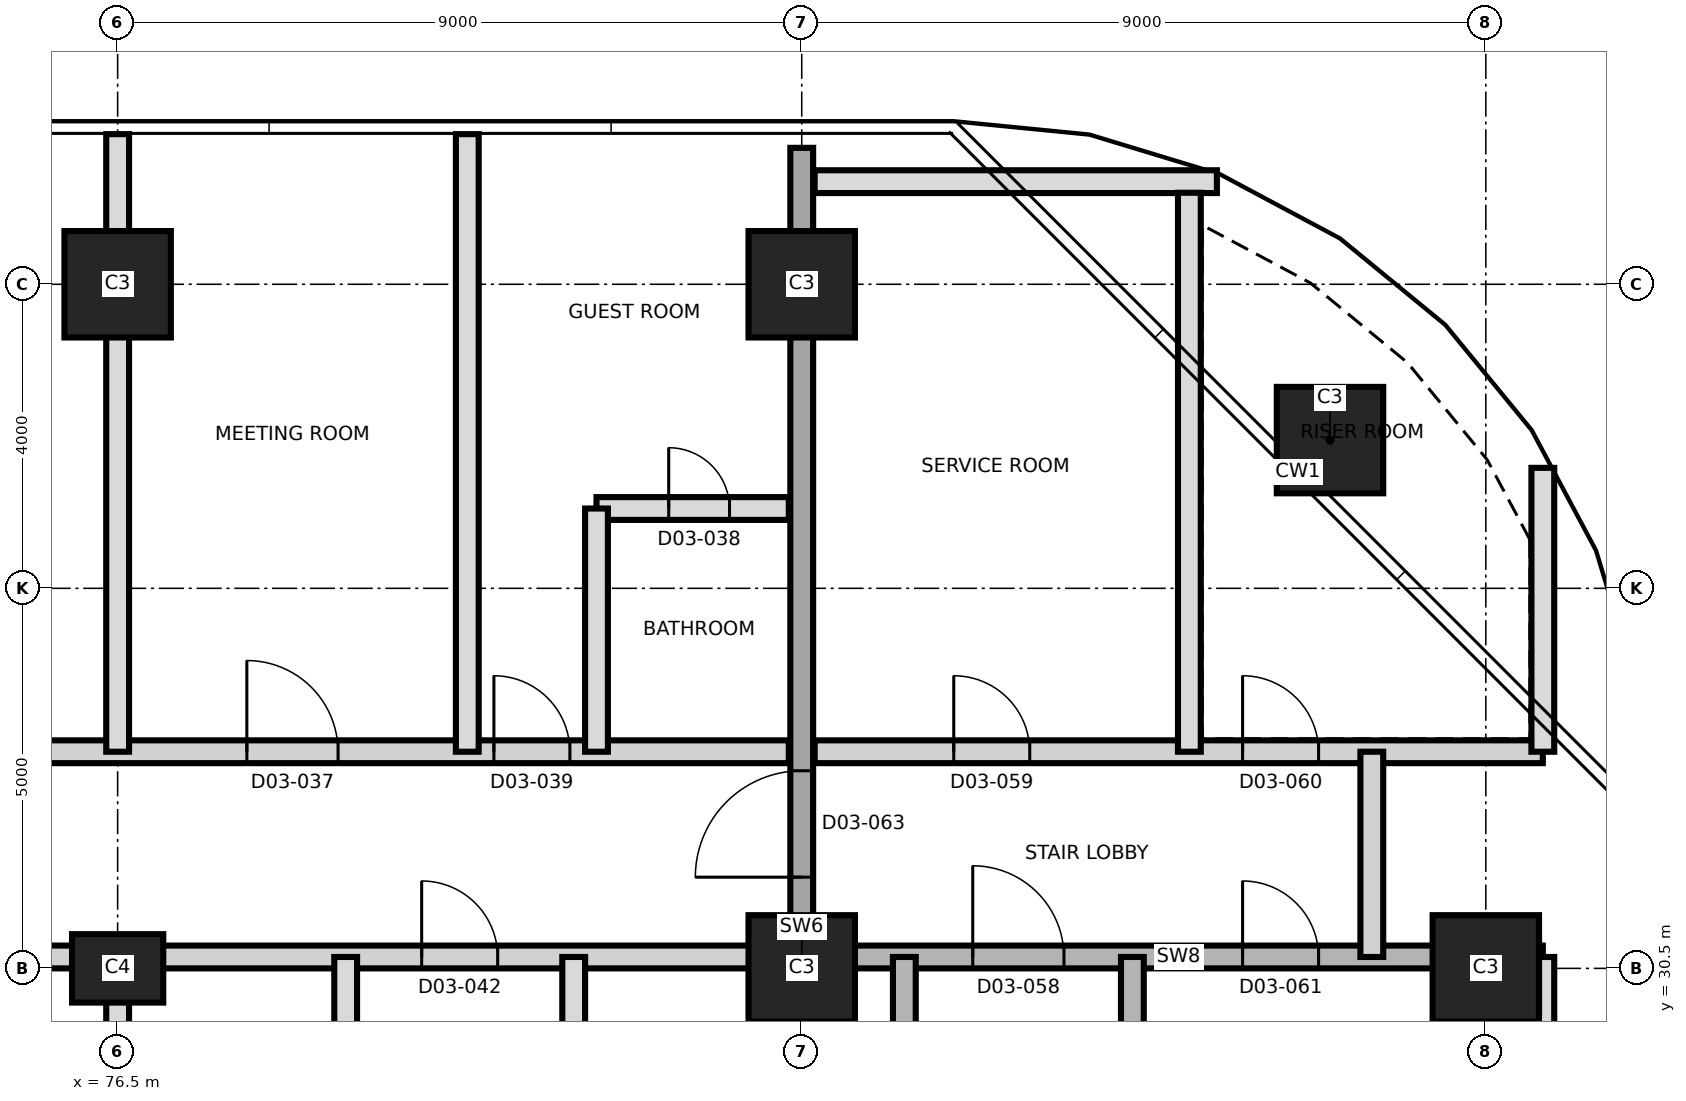
"""IFC4 building model, lengths in metres.
Left out: names, types, materials, properties, quantities, classifications, styles, units other than length and angle.
Written with IfcOpenShell. Run it as: python <this file> out.ifc"""

import sys

from ifc_helpers import new_model, si_unit, direction, frame, frame_2d, origin, origin_2d, place, context, subcontext, project, spatial, rectangle, extrude, element, fill, save


model = new_model("IFC4")
c1 = context("Model", 3, precision=1e-05, world=origin(), true_north=direction((0.0, 1.0)))
c2 = subcontext(c1, "Body", "Model", "MODEL_VIEW")
j1 = project(units=[si_unit("LENGTHUNIT", "METRE"), si_unit("PLANEANGLEUNIT", "RADIAN")], contexts=[c1])
p1 = place(None, origin())
s1 = spatial("IfcSite", under=j1, at=p1, CompositionType="ELEMENT")
p2 = place(p1, origin())
s2 = spatial("IfcBuilding", under=s1, at=p2, CompositionType="ELEMENT")
p3 = place(p2, frame((0.0, 0.0, 59.4)))
s3 = spatial("IfcBuildingStorey", under=s2, at=p3, CompositionType="ELEMENT", Elevation=59.4)
p4 = place(p3, frame((76.5, 30.5, 0.0), z_axis=(0.0, 0.0, 1.0), x_axis=(1.0, 0.0, 0.0)))
e1 = element("IfcColumn", 1, at=p4, inside=s3, PredefinedType="COLUMN", context=c2, shape_type="SweptSolid", body=[
    extrude(rectangle(XDim=1.2, YDim=0.9, at=origin_2d()), origin(), (0.0, 0.0, 1.0), 3.7),
])
for number, where, z_axis, x_axis in (
    (2, (85.5, 30.5, 0.0), (0.0, 0.0, 1.0), (1.0, 0.0, 0.0)),
    (3, (94.5, 30.5, 0.0), (0.0, 0.0, 1.0), (1.0, 0.0, 0.0)),
    (4, (92.45, 37.45, 0.0), (0.0, 0.0, 1.0), (1.0, 0.0, 0.0)),
    (5, (76.5, 39.5, 0.0), (0.0, 0.0, 1.0), (1.0, 0.0, 0.0)),
    (6, (85.5, 39.5, 0.0), (0.0, 0.0, 1.0), (1.0, 0.0, 0.0)),
):
    element("IfcColumn", number, at=place(p3, frame(where, z_axis=z_axis, x_axis=x_axis)), inside=s3, PredefinedType="COLUMN", context=c2, shape_type="SweptSolid", body=[
        extrude(rectangle(XDim=1.4, YDim=1.4, at=origin_2d()), origin(), (0.0, 0.0, 1.0), 3.7),
    ])
p5 = place(p3, frame((85.5, 19.705, 0.0), z_axis=(0.0, 0.0, 1.0), x_axis=(0.0, 1.0, 0.0)))
e7 = element("IfcWall", 7, at=p5, inside=s3, PredefinedType="SHEAR", context=c2, shape_type="SweptSolid", body=[
    extrude(rectangle(XDim=21.59, YDim=0.3, at=frame_2d((10.795, 0.0))), origin(), (0.0, 0.0, 1.0), 3.7),
])
p6 = place(p5, frame((11.995, 0.0, 0.0)))
e8 = element("IfcOpeningElement", 8, at=p6, cuts=e7, PredefinedType="OPENING", context=c2, shape_type="SweptSolid", body=[
    extrude(rectangle(XDim=1.4, YDim=2.1, at=frame_2d((0.7, 1.05))), frame((0.0, 0.16, 0.0), z_axis=(0.0, -1.0, 0.0), x_axis=(1.0, 0.0, 0.0)), (0.0, 0.0, 1.0), 0.32),
])
p7 = place(p3, frame((58.95, 30.65, 0.0), z_axis=(0.0, 0.0, 1.0), x_axis=(1.0, 0.0, 0.0)))
e9 = element("IfcWall", 9, at=p7, inside=s3, PredefinedType="PARTITIONING", context=c2, shape_type="SweptSolid", body=[
    extrude(rectangle(XDim=26.38, YDim=0.3, at=frame_2d((13.19, 0.0))), origin(), (0.0, 0.0, 1.0), 3.4),
])
p8 = place(p7, frame((0.685, 0.0, 0.0)))
e10 = element("IfcOpeningElement", 10, at=p8, cuts=e9, PredefinedType="OPENING", context=c2, shape_type="SweptSolid", body=[
    extrude(rectangle(XDim=1.2, YDim=2.1, at=frame_2d((0.6, 1.05))), frame((0.0, 0.16, 0.0), z_axis=(0.0, -1.0, 0.0), x_axis=(1.0, 0.0, 0.0)), (0.0, 0.0, 1.0), 0.32),
])
p9 = place(p7, frame((3.935, 0.0, 0.0)))
e11 = element("IfcOpeningElement", 11, at=p9, cuts=e9, PredefinedType="OPENING", context=c2, shape_type="SweptSolid", body=[
    extrude(rectangle(XDim=1.0, YDim=2.1, at=frame_2d((0.5, 1.05))), frame((0.0, 0.16, 0.0), z_axis=(0.0, -1.0, 0.0), x_axis=(1.0, 0.0, 0.0)), (0.0, 0.0, 1.0), 0.32),
])
p10 = place(p7, frame((9.685, 0.0, 0.0)))
e12 = element("IfcOpeningElement", 12, at=p10, cuts=e9, PredefinedType="OPENING", context=c2, shape_type="SweptSolid", body=[
    extrude(rectangle(XDim=1.2, YDim=2.1, at=frame_2d((0.6, 1.05))), frame((0.0, 0.16, 0.0), z_axis=(0.0, -1.0, 0.0), x_axis=(1.0, 0.0, 0.0)), (0.0, 0.0, 1.0), 0.32),
])
p11 = place(p7, frame((12.935, 0.0, 0.0)))
e13 = element("IfcOpeningElement", 13, at=p11, cuts=e9, PredefinedType="OPENING", context=c2, shape_type="SweptSolid", body=[
    extrude(rectangle(XDim=1.0, YDim=2.1, at=frame_2d((0.5, 1.05))), frame((0.0, 0.16, 0.0), z_axis=(0.0, -1.0, 0.0), x_axis=(1.0, 0.0, 0.0)), (0.0, 0.0, 1.0), 0.32),
])
p12 = place(p7, frame((21.55, 0.0, 0.0)))
e14 = element("IfcOpeningElement", 14, at=p12, cuts=e9, PredefinedType="OPENING", context=c2, shape_type="SweptSolid", body=[
    extrude(rectangle(XDim=1.0, YDim=2.4, at=frame_2d((0.5, 1.2))), frame((0.0, 0.16, 0.0), z_axis=(0.0, -1.0, 0.0), x_axis=(1.0, 0.0, 0.0)), (0.0, 0.0, 1.0), 0.32),
])
p13 = place(p3, frame((85.67, 30.65, 0.0), z_axis=(0.0, 0.0, 1.0), x_axis=(1.0, 0.0, 0.0)))
e15 = element("IfcWall", 15, at=p13, inside=s3, PredefinedType="SHEAR", context=c2, shape_type="SweptSolid", body=[
    extrude(rectangle(XDim=9.58, YDim=0.3, at=frame_2d((4.79, 0.0))), origin(), (0.0, 0.0, 1.0), 3.4),
])
p14 = place(p13, frame((2.08, 0.0, 0.0)))
e16 = element("IfcOpeningElement", 16, at=p14, cuts=e15, PredefinedType="OPENING", context=c2, shape_type="SweptSolid", body=[
    extrude(rectangle(XDim=1.2, YDim=2.1, at=frame_2d((0.6, 1.05))), frame((0.0, 0.16, 0.0), z_axis=(0.0, -1.0, 0.0), x_axis=(1.0, 0.0, 0.0)), (0.0, 0.0, 1.0), 0.32),
])
p15 = place(p13, frame((5.63, 0.0, 0.0)))
e17 = element("IfcOpeningElement", 17, at=p15, cuts=e15, PredefinedType="OPENING", context=c2, shape_type="SweptSolid", body=[
    extrude(rectangle(XDim=1.0, YDim=2.1, at=frame_2d((0.5, 1.05))), frame((0.0, 0.16, 0.0), z_axis=(0.0, -1.0, 0.0), x_axis=(1.0, 0.0, 0.0)), (0.0, 0.0, 1.0), 0.32),
])
p16 = place(p3, frame((58.95, 33.35, 0.0), z_axis=(0.0, 0.0, 1.0), x_axis=(1.0, 0.0, 0.0)))
e18 = element("IfcWall", 18, at=p16, inside=s3, PredefinedType="PARTITIONING", context=c2, shape_type="SweptSolid", body=[
    extrude(rectangle(XDim=26.38, YDim=0.3, at=frame_2d((13.19, 0.0))), origin(), (0.0, 0.0, 1.0), 3.4),
])
p17 = place(p16, frame((0.685, 0.0, 0.0)))
e19 = element("IfcOpeningElement", 19, at=p17, cuts=e18, PredefinedType="OPENING", context=c2, shape_type="SweptSolid", body=[
    extrude(rectangle(XDim=1.2, YDim=2.1, at=frame_2d((0.6, 1.05))), frame((0.0, 0.16, 0.0), z_axis=(0.0, -1.0, 0.0), x_axis=(1.0, 0.0, 0.0)), (0.0, 0.0, 1.0), 0.32),
])
p18 = place(p16, frame((3.935, 0.0, 0.0)))
e20 = element("IfcOpeningElement", 20, at=p18, cuts=e18, PredefinedType="OPENING", context=c2, shape_type="SweptSolid", body=[
    extrude(rectangle(XDim=1.0, YDim=2.1, at=frame_2d((0.5, 1.05))), frame((0.0, 0.16, 0.0), z_axis=(0.0, -1.0, 0.0), x_axis=(1.0, 0.0, 0.0)), (0.0, 0.0, 1.0), 0.32),
])
p19 = place(p16, frame((14.2, 0.0, 0.0)))
e21 = element("IfcOpeningElement", 21, at=p19, cuts=e18, PredefinedType="OPENING", context=c2, shape_type="SweptSolid", body=[
    extrude(rectangle(XDim=1.0, YDim=2.4, at=frame_2d((0.5, 1.2))), frame((0.0, 0.16, 0.0), z_axis=(0.0, -1.0, 0.0), x_axis=(1.0, 0.0, 0.0)), (0.0, 0.0, 1.0), 0.32),
])
p20 = place(p16, frame((19.25, 0.0, 0.0)))
e22 = element("IfcOpeningElement", 22, at=p20, cuts=e18, PredefinedType="OPENING", context=c2, shape_type="SweptSolid", body=[
    extrude(rectangle(XDim=1.2, YDim=2.1, at=frame_2d((0.6, 1.05))), frame((0.0, 0.16, 0.0), z_axis=(0.0, -1.0, 0.0), x_axis=(1.0, 0.0, 0.0)), (0.0, 0.0, 1.0), 0.32),
])
p21 = place(p16, frame((22.5, 0.0, 0.0)))
e23 = element("IfcOpeningElement", 23, at=p21, cuts=e18, PredefinedType="OPENING", context=c2, shape_type="SweptSolid", body=[
    extrude(rectangle(XDim=1.0, YDim=2.1, at=frame_2d((0.5, 1.05))), frame((0.0, 0.16, 0.0), z_axis=(0.0, -1.0, 0.0), x_axis=(1.0, 0.0, 0.0)), (0.0, 0.0, 1.0), 0.32),
])
p22 = place(p3, frame((85.67, 33.35, 0.0), z_axis=(0.0, 0.0, 1.0), x_axis=(1.0, 0.0, 0.0)))
e24 = element("IfcWall", 24, at=p22, inside=s3, PredefinedType="PARTITIONING", context=c2, shape_type="SweptSolid", body=[
    extrude(rectangle(XDim=9.58, YDim=0.3, at=frame_2d((4.79, 0.0))), origin(), (0.0, 0.0, 1.0), 3.4),
])
p23 = place(p22, frame((1.83, 0.0, 0.0)))
e25 = element("IfcOpeningElement", 25, at=p23, cuts=e24, PredefinedType="OPENING", context=c2, shape_type="SweptSolid", body=[
    extrude(rectangle(XDim=1.0, YDim=2.1, at=frame_2d((0.5, 1.05))), frame((0.0, 0.16, 0.0), z_axis=(0.0, -1.0, 0.0), x_axis=(1.0, 0.0, 0.0)), (0.0, 0.0, 1.0), 0.32),
])
p24 = place(p22, frame((5.63, 0.0, 0.0)))
e26 = element("IfcOpeningElement", 26, at=p24, cuts=e24, PredefinedType="OPENING", context=c2, shape_type="SweptSolid", body=[
    extrude(rectangle(XDim=1.0, YDim=2.1, at=frame_2d((0.5, 1.05))), frame((0.0, 0.16, 0.0), z_axis=(0.0, -1.0, 0.0), x_axis=(1.0, 0.0, 0.0)), (0.0, 0.0, 1.0), 0.32),
])
p25 = place(p3, frame((82.8, 36.55, 0.0), z_axis=(0.0, 0.0, 1.0), x_axis=(1.0, 0.0, 0.0)))
e27 = element("IfcWall", 27, at=p25, inside=s3, PredefinedType="PARTITIONING", context=c2, shape_type="SweptSolid", body=[
    extrude(rectangle(XDim=2.53, YDim=0.3, at=frame_2d((1.265, 0.0))), origin(), (0.0, 0.0, 1.0), 3.4),
])
p26 = place(p25, frame((0.95, 0.0, 0.0)))
e28 = element("IfcOpeningElement", 28, at=p26, cuts=e27, PredefinedType="OPENING", context=c2, shape_type="SweptSolid", body=[
    extrude(rectangle(XDim=0.8, YDim=2.1, at=frame_2d((0.4, 1.05))), frame((0.0, 0.16, 0.0), z_axis=(0.0, -1.0, 0.0), x_axis=(1.0, 0.0, 0.0)), (0.0, 0.0, 1.0), 0.32),
])
p27 = place(p3, frame((85.67, 40.85, 0.0), z_axis=(0.0, 0.0, 1.0), x_axis=(1.0, 0.0, 0.0)))
e29 = element("IfcWall", 29, at=p27, inside=s3, PredefinedType="PARTITIONING", context=c2, shape_type="SweptSolid", body=[
    extrude(rectangle(XDim=5.292, YDim=0.3, at=frame_2d((2.646, 0.0))), origin(), (0.0, 0.0, 1.0), 3.4),
])
p28 = place(p3, frame((76.5, 19.705, 0.0), z_axis=(0.0, 0.0, 1.0), x_axis=(0.0, 1.0, 0.0)))
e30 = element("IfcWall", 30, at=p28, inside=s3, PredefinedType="PARTITIONING", context=c2, shape_type="SweptSolid", body=[
    extrude(rectangle(XDim=10.945, YDim=0.3, at=frame_2d((5.472, 0.0))), origin(), (0.0, 0.0, 1.0), 3.4),
])
p29 = place(p3, frame((76.5, 33.35, 0.0), z_axis=(0.0, 0.0, 1.0), x_axis=(0.0, 1.0, 0.0)))
e31 = element("IfcWall", 31, at=p29, inside=s3, PredefinedType="PARTITIONING", context=c2, shape_type="SweptSolid", body=[
    extrude(rectangle(XDim=8.125, YDim=0.3, at=frame_2d((4.062, 0.0))), origin(), (0.0, 0.0, 1.0), 3.4),
])
p30 = place(p3, frame((79.5, 27.35, 0.0), z_axis=(0.0, 0.0, 1.0), x_axis=(0.0, 1.0, 0.0)))
e32 = element("IfcWall", 32, at=p30, inside=s3, PredefinedType="PARTITIONING", context=c2, shape_type="SweptSolid", body=[
    extrude(rectangle(XDim=3.3, YDim=0.3, at=frame_2d((1.65, 0.0))), origin(), (0.0, 0.0, 1.0), 3.4),
])
p31 = place(p3, frame((81.1, 33.35, 0.0), z_axis=(0.0, 0.0, 1.0), x_axis=(0.0, 1.0, 0.0)))
e33 = element("IfcWall", 33, at=p31, inside=s3, PredefinedType="PARTITIONING", context=c2, shape_type="SweptSolid", body=[
    extrude(rectangle(XDim=8.125, YDim=0.3, at=frame_2d((4.062, 0.0))), origin(), (0.0, 0.0, 1.0), 3.4),
])
p32 = place(p3, frame((82.5, 27.35, 0.0), z_axis=(0.0, 0.0, 1.0), x_axis=(0.0, 1.0, 0.0)))
e34 = element("IfcWall", 34, at=p32, inside=s3, PredefinedType="PARTITIONING", context=c2, shape_type="SweptSolid", body=[
    extrude(rectangle(XDim=3.3, YDim=0.3, at=frame_2d((1.65, 0.0))), origin(), (0.0, 0.0, 1.0), 3.4),
])
p33 = place(p3, frame((82.8, 33.35, 0.0), z_axis=(0.0, 0.0, 1.0), x_axis=(0.0, 1.0, 0.0)))
e35 = element("IfcWall", 35, at=p33, inside=s3, PredefinedType="PARTITIONING", context=c2, shape_type="SweptSolid", body=[
    extrude(rectangle(XDim=3.2, YDim=0.3, at=frame_2d((1.6, 0.0))), origin(), (0.0, 0.0, 1.0), 3.4),
])
for number, where, z_axis, x_axis in (
    (36, (86.85, 21.8, 0.0), (0.0, 0.0, 1.0), (0.0, 1.0, 0.0)),
    (37, (89.85, 21.8, 0.0), (0.0, 0.0, 1.0), (0.0, 1.0, 0.0)),
):
    element("IfcWall", number, at=place(p3, frame(where, z_axis=z_axis, x_axis=x_axis)), inside=s3, PredefinedType="SHEAR", context=c2, shape_type="SweptSolid", body=[
        extrude(rectangle(XDim=8.85, YDim=0.3, at=frame_2d((4.425, 0.0))), origin(), (0.0, 0.0, 1.0), 3.4),
    ])
p34 = place(p3, frame((90.6, 33.35, 0.0), z_axis=(0.0, 0.0, 1.0), x_axis=(0.0, 1.0, 0.0)))
e38 = element("IfcWall", 38, at=p34, inside=s3, PredefinedType="PARTITIONING", context=c2, shape_type="SweptSolid", body=[
    extrude(rectangle(XDim=7.354, YDim=0.3, at=frame_2d((3.677, 0.0))), origin(), (0.0, 0.0, 1.0), 3.4),
])
p35 = place(p3, frame((93.0, 30.65, 0.0), z_axis=(0.0, 0.0, 1.0), x_axis=(0.0, 1.0, 0.0)))
e39 = element("IfcWall", 39, at=p35, inside=s3, PredefinedType="PARTITIONING", context=c2, shape_type="SweptSolid", body=[
    extrude(rectangle(XDim=2.7, YDim=0.3, at=frame_2d((1.35, 0.0))), origin(), (0.0, 0.0, 1.0), 3.4),
])
p36 = place(p3, frame((95.25, 23.915, 0.0), z_axis=(0.0, 0.0, 1.0), x_axis=(0.0, 1.0, 0.0)))
e40 = element("IfcWall", 40, at=p36, inside=s3, PredefinedType="PARTITIONING", context=c2, shape_type="SweptSolid", body=[
    extrude(rectangle(XDim=6.735, YDim=0.3, at=frame_2d((3.367, 0.0))), origin(), (0.0, 0.0, 1.0), 3.4),
])
p37 = place(p3, frame((95.25, 33.35, 0.0), z_axis=(0.0, 0.0, 1.0), x_axis=(0.0, 1.0, 0.0)))
e41 = element("IfcWall", 41, at=p37, inside=s3, PredefinedType="PARTITIONING", context=c2, shape_type="SweptSolid", body=[
    extrude(rectangle(XDim=3.735, YDim=0.3, at=frame_2d((1.867, 0.0))), origin(), (0.0, 0.0, 1.0), 3.4),
])
p38 = place(p20, origin())
e42 = element("IfcDoor", 42, at=p38, inside=s3, OperationType="SINGLE_SWING_RIGHT", PredefinedType="DOOR", context=c2, shape_type="SweptSolid", body=[
    extrude(rectangle(XDim=1.2, YDim=2.1, at=frame_2d((0.6, 1.05))), frame((0.0, 0.025, 0.0), z_axis=(0.0, -1.0, 0.0), x_axis=(1.0, 0.0, 0.0)), (0.0, 0.0, 1.0), 0.05),
])
fill(e22, e42)
p39 = place(p26, origin())
e43 = element("IfcDoor", 43, at=p39, inside=s3, OperationType="SINGLE_SWING_LEFT", PredefinedType="DOOR", context=c2, shape_type="SweptSolid", body=[
    extrude(rectangle(XDim=0.8, YDim=2.1, at=frame_2d((0.4, 1.05))), frame((0.0, 0.025, 0.0), z_axis=(0.0, -1.0, 0.0), x_axis=(1.0, 0.0, 0.0)), (0.0, 0.0, 1.0), 0.05),
])
fill(e28, e43)
p40 = place(p21, origin())
e44 = element("IfcDoor", 44, at=p40, inside=s3, OperationType="SINGLE_SWING_LEFT", PredefinedType="DOOR", context=c2, shape_type="SweptSolid", body=[
    extrude(rectangle(XDim=1.0, YDim=2.1, at=frame_2d((0.5, 1.05))), frame((0.0, 0.025, 0.0), z_axis=(0.0, -1.0, 0.0), x_axis=(1.0, 0.0, 0.0)), (0.0, 0.0, 1.0), 0.05),
])
fill(e23, e44)
p41 = place(p12, origin())
e45 = element("IfcDoor", 45, at=p41, inside=s3, OperationType="SINGLE_SWING_RIGHT", PredefinedType="DOOR", context=c2, shape_type="SweptSolid", body=[
    extrude(rectangle(XDim=1.0, YDim=2.4, at=frame_2d((0.5, 1.2))), frame((0.0, 0.025, 0.0), z_axis=(0.0, -1.0, 0.0), x_axis=(1.0, 0.0, 0.0)), (0.0, 0.0, 1.0), 0.05),
])
fill(e14, e45)
p42 = place(p14, origin())
e46 = element("IfcDoor", 46, at=p42, inside=s3, OperationType="SINGLE_SWING_LEFT", PredefinedType="DOOR", context=c2, shape_type="SweptSolid", body=[
    extrude(rectangle(XDim=1.2, YDim=2.1, at=frame_2d((0.6, 1.05))), frame((0.0, 0.025, 0.0), z_axis=(0.0, -1.0, 0.0), x_axis=(1.0, 0.0, 0.0)), (0.0, 0.0, 1.0), 0.05),
])
fill(e16, e46)
p43 = place(p23, origin())
e47 = element("IfcDoor", 47, at=p43, inside=s3, OperationType="SINGLE_SWING_LEFT", PredefinedType="DOOR", context=c2, shape_type="SweptSolid", body=[
    extrude(rectangle(XDim=1.0, YDim=2.1, at=frame_2d((0.5, 1.05))), frame((0.0, 0.025, 0.0), z_axis=(0.0, -1.0, 0.0), x_axis=(1.0, 0.0, 0.0)), (0.0, 0.0, 1.0), 0.05),
])
fill(e25, e47)
p44 = place(p24, origin())
e48 = element("IfcDoor", 48, at=p44, inside=s3, OperationType="SINGLE_SWING_RIGHT", PredefinedType="DOOR", context=c2, shape_type="SweptSolid", body=[
    extrude(rectangle(XDim=1.0, YDim=2.1, at=frame_2d((0.5, 1.05))), frame((0.0, 0.025, 0.0), z_axis=(0.0, -1.0, 0.0), x_axis=(1.0, 0.0, 0.0)), (0.0, 0.0, 1.0), 0.05),
])
fill(e26, e48)
p45 = place(p15, origin())
e49 = element("IfcDoor", 49, at=p45, inside=s3, OperationType="SINGLE_SWING_LEFT", PredefinedType="DOOR", context=c2, shape_type="SweptSolid", body=[
    extrude(rectangle(XDim=1.0, YDim=2.1, at=frame_2d((0.5, 1.05))), frame((0.0, 0.025, 0.0), z_axis=(0.0, -1.0, 0.0), x_axis=(1.0, 0.0, 0.0)), (0.0, 0.0, 1.0), 0.05),
])
fill(e17, e49)
p46 = place(p6, origin())
e50 = element("IfcDoor", 50, at=p46, inside=s3, OperationType="SINGLE_SWING_RIGHT", PredefinedType="DOOR", context=c2, shape_type="SweptSolid", body=[
    extrude(rectangle(XDim=1.4, YDim=2.1, at=frame_2d((0.7, 1.05))), frame((0.0, 0.025, 0.0), z_axis=(0.0, -1.0, 0.0), x_axis=(1.0, 0.0, 0.0)), (0.0, 0.0, 1.0), 0.05),
])
fill(e8, e50)
save(model, sys.argv[1])
